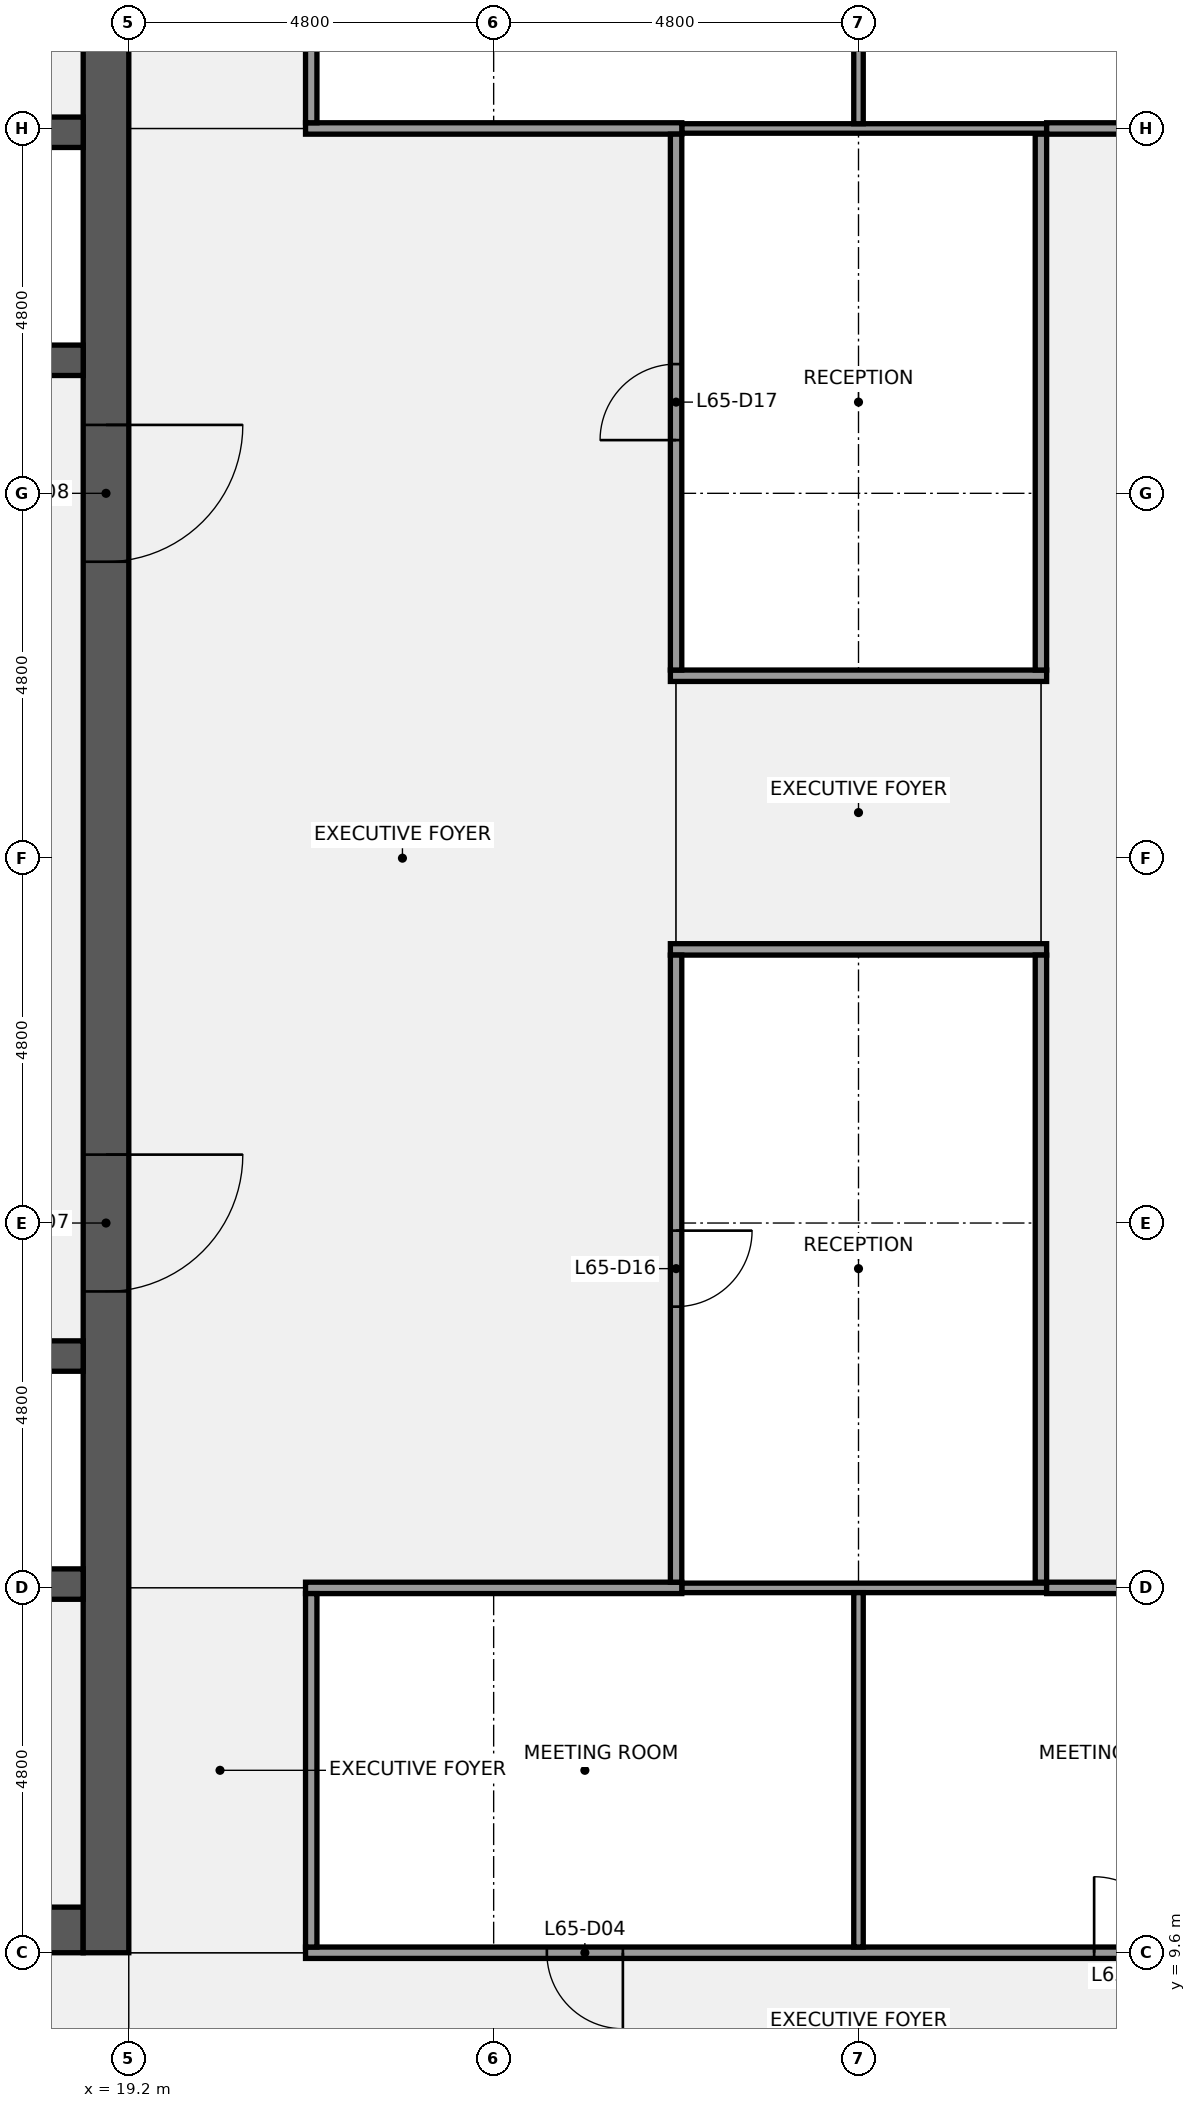
"""IFC4 building model, lengths in metres.
Left out: names, types, materials, properties, quantities, classifications, styles, units other than length and angle.
Written with IfcOpenShell. Run it as: python <this file> out.ifc"""

import sys

from ifc_helpers import new_model, si_unit, direction, frame, frame_2d, origin, place, context, subcontext, project, spatial, rectangle, extrude, element, fill, save


model = new_model("IFC4")
c1 = context("Model", 3, precision=1e-05, world=origin(), true_north=direction((0.0, 1.0)))
c2 = subcontext(c1, "Body", "Model", "MODEL_VIEW")
j1 = project(units=[si_unit("LENGTHUNIT", "METRE"), si_unit("PLANEANGLEUNIT", "RADIAN")], contexts=[c1])
p1 = place(None, origin())
s1 = spatial("IfcSite", under=j1, at=p1, CompositionType="ELEMENT")
p2 = place(p1, origin())
s2 = spatial("IfcBuilding", under=s1, at=p2, CompositionType="ELEMENT")
p3 = place(p2, frame((0.0, 0.0, 298.3)))
s3 = spatial("IfcBuildingStorey", under=s2, at=p3, CompositionType="ELEMENT", Elevation=298.3)
p4 = place(p3, frame((18.6, 9.9, 0.0), z_axis=(0.0, 0.0, 1.0), x_axis=(-1.0, 0.0, 0.0)))
e1 = element("IfcWall", 1, at=p4, inside=s3, PredefinedType="SHEAR", context=c2, shape_type="SweptSolid", body=[
    extrude(rectangle(XDim=4.2, YDim=0.6, at=frame_2d((2.1, 0.0))), origin(), (0.0, 0.0, 1.0), 3.84),
])
p5 = place(p4, frame((1.25, 0.0, 0.0)))
e2 = element("IfcOpeningElement", 2, at=p5, cuts=e1, PredefinedType="OPENING", context=c2, shape_type="SweptSolid", body=[
    extrude(rectangle(XDim=1.1, YDim=2.1, at=frame_2d((0.55, 1.05))), frame((0.0, 0.31, 0.0), z_axis=(0.0, -1.0, 0.0), x_axis=(1.0, 0.0, 0.0)), (0.0, 0.0, 1.0), 0.62),
])
p6 = place(p3, frame((18.9, 38.4, 0.0), z_axis=(0.0, 0.0, 1.0), x_axis=(0.0, -1.0, 0.0)))
e3 = element("IfcWall", 3, at=p6, inside=s3, PredefinedType="SHEAR", context=c2, shape_type="SweptSolid", body=[
    extrude(rectangle(XDim=28.8, YDim=0.6, at=frame_2d((14.4, 0.0))), origin(), (0.0, 0.0, 1.0), 3.84),
])
p7 = place(p6, frame((18.3, 0.0, 0.0)))
e4 = element("IfcOpeningElement", 4, at=p7, cuts=e3, PredefinedType="OPENING", context=c2, shape_type="SweptSolid", body=[
    extrude(rectangle(XDim=1.8, YDim=2.1, at=frame_2d((0.9, 1.05))), frame((0.0, 0.31, 0.0), z_axis=(0.0, -1.0, 0.0), x_axis=(1.0, 0.0, 0.0)), (0.0, 0.0, 1.0), 0.62),
])
p8 = place(p6, frame((8.7, 0.0, 0.0)))
e5 = element("IfcOpeningElement", 5, at=p8, cuts=e3, PredefinedType="OPENING", context=c2, shape_type="SweptSolid", body=[
    extrude(rectangle(XDim=1.8, YDim=2.1, at=frame_2d((0.9, 1.05))), frame((0.0, 0.31, 0.0), z_axis=(0.0, -1.0, 0.0), x_axis=(1.0, 0.0, 0.0)), (0.0, 0.0, 1.0), 0.62),
])
p9 = place(p3, frame((0.6, 14.45, 0.0), z_axis=(0.0, 0.0, 1.0), x_axis=(1.0, 0.0, 0.0)))
e6 = element("IfcWall", 6, at=p9, inside=s3, PredefinedType="SHEAR", context=c2, shape_type="SweptSolid", body=[
    extrude(rectangle(XDim=18.0, YDim=0.4, at=frame_2d((9.0, 0.0))), origin(), (0.0, 0.0, 1.0), 3.84),
])
p10 = place(p3, frame((0.6, 17.45, 0.0), z_axis=(0.0, 0.0, 1.0), x_axis=(1.0, 0.0, 0.0)))
e7 = element("IfcWall", 7, at=p10, inside=s3, PredefinedType="SHEAR", context=c2, shape_type="SweptSolid", body=[
    extrude(rectangle(XDim=18.0, YDim=0.4, at=frame_2d((9.0, 0.0))), origin(), (0.0, 0.0, 1.0), 3.84),
])
p11 = place(p10, frame((1.262, 0.0, 0.0)))
e8 = element("IfcOpeningElement", 8, at=p11, cuts=e7, PredefinedType="OPENING", context=c2, shape_type="SweptSolid", body=[
    extrude(rectangle(XDim=1.0, YDim=2.1, at=frame_2d((0.5, 1.05))), frame((0.0, 0.21, 0.0), z_axis=(0.0, -1.0, 0.0), x_axis=(1.0, 0.0, 0.0)), (0.0, 0.0, 1.0), 0.42),
])
p12 = place(p10, frame((7.3, 0.0, 0.0)))
e9 = element("IfcOpeningElement", 9, at=p12, cuts=e7, PredefinedType="OPENING", context=c2, shape_type="SweptSolid", body=[
    extrude(rectangle(XDim=1.0, YDim=2.1, at=frame_2d((0.5, 1.05))), frame((0.0, 0.21, 0.0), z_axis=(0.0, -1.0, 0.0), x_axis=(1.0, 0.0, 0.0)), (0.0, 0.0, 1.0), 0.42),
])
p13 = place(p10, frame((14.538, 0.0, 0.0)))
e10 = element("IfcOpeningElement", 10, at=p13, cuts=e7, PredefinedType="OPENING", context=c2, shape_type="SweptSolid", body=[
    extrude(rectangle(XDim=1.0, YDim=2.1, at=frame_2d((0.5, 1.05))), frame((0.0, 0.21, 0.0), z_axis=(0.0, -1.0, 0.0), x_axis=(1.0, 0.0, 0.0)), (0.0, 0.0, 1.0), 0.42),
])
p14 = place(p3, frame((0.6, 30.55, 0.0), z_axis=(0.0, 0.0, 1.0), x_axis=(1.0, 0.0, 0.0)))
e11 = element("IfcWall", 11, at=p14, inside=s3, PredefinedType="SHEAR", context=c2, shape_type="SweptSolid", body=[
    extrude(rectangle(XDim=18.0, YDim=0.4, at=frame_2d((9.0, 0.0))), origin(), (0.0, 0.0, 1.0), 3.84),
])
p15 = place(p14, frame((1.6, 0.0, 0.0)))
e12 = element("IfcOpeningElement", 12, at=p15, cuts=e11, PredefinedType="OPENING", context=c2, shape_type="SweptSolid", body=[
    extrude(rectangle(XDim=1.2, YDim=2.1, at=frame_2d((0.6, 1.05))), frame((0.0, 0.21, 0.0), z_axis=(0.0, -1.0, 0.0), x_axis=(1.0, 0.0, 0.0)), (0.0, 0.0, 1.0), 0.42),
])
p16 = place(p14, frame((4.2, 0.0, 0.0)))
e13 = element("IfcOpeningElement", 13, at=p16, cuts=e11, PredefinedType="OPENING", context=c2, shape_type="SweptSolid", body=[
    extrude(rectangle(XDim=1.2, YDim=2.1, at=frame_2d((0.6, 1.05))), frame((0.0, 0.21, 0.0), z_axis=(0.0, -1.0, 0.0), x_axis=(1.0, 0.0, 0.0)), (0.0, 0.0, 1.0), 0.42),
])
p17 = place(p14, frame((6.8, 0.0, 0.0)))
e14 = element("IfcOpeningElement", 14, at=p17, cuts=e11, PredefinedType="OPENING", context=c2, shape_type="SweptSolid", body=[
    extrude(rectangle(XDim=1.2, YDim=2.1, at=frame_2d((0.6, 1.05))), frame((0.0, 0.21, 0.0), z_axis=(0.0, -1.0, 0.0), x_axis=(1.0, 0.0, 0.0)), (0.0, 0.0, 1.0), 0.42),
])
p18 = place(p14, frame((10.0, 0.0, 0.0)))
e15 = element("IfcOpeningElement", 15, at=p18, cuts=e11, PredefinedType="OPENING", context=c2, shape_type="SweptSolid", body=[
    extrude(rectangle(XDim=1.2, YDim=2.1, at=frame_2d((0.6, 1.05))), frame((0.0, 0.21, 0.0), z_axis=(0.0, -1.0, 0.0), x_axis=(1.0, 0.0, 0.0)), (0.0, 0.0, 1.0), 0.42),
])
p19 = place(p14, frame((12.6, 0.0, 0.0)))
e16 = element("IfcOpeningElement", 16, at=p19, cuts=e11, PredefinedType="OPENING", context=c2, shape_type="SweptSolid", body=[
    extrude(rectangle(XDim=1.2, YDim=2.1, at=frame_2d((0.6, 1.05))), frame((0.0, 0.21, 0.0), z_axis=(0.0, -1.0, 0.0), x_axis=(1.0, 0.0, 0.0)), (0.0, 0.0, 1.0), 0.42),
])
p20 = place(p14, frame((15.2, 0.0, 0.0)))
e17 = element("IfcOpeningElement", 17, at=p20, cuts=e11, PredefinedType="OPENING", context=c2, shape_type="SweptSolid", body=[
    extrude(rectangle(XDim=1.2, YDim=2.1, at=frame_2d((0.6, 1.05))), frame((0.0, 0.21, 0.0), z_axis=(0.0, -1.0, 0.0), x_axis=(1.0, 0.0, 0.0)), (0.0, 0.0, 1.0), 0.42),
])
p21 = place(p3, frame((0.6, 33.55, 0.0), z_axis=(0.0, 0.0, 1.0), x_axis=(1.0, 0.0, 0.0)))
e18 = element("IfcWall", 18, at=p21, inside=s3, PredefinedType="SHEAR", context=c2, shape_type="SweptSolid", body=[
    extrude(rectangle(XDim=18.0, YDim=0.4, at=frame_2d((9.0, 0.0))), origin(), (0.0, 0.0, 1.0), 3.84),
])
p22 = place(p3, frame((21.525, 9.6, 0.0), z_axis=(0.0, 0.0, 1.0), x_axis=(1.0, 0.0, 0.0)))
e19 = element("IfcWall", 19, at=p22, inside=s3, PredefinedType="PARTITIONING", context=c2, shape_type="SweptSolid", body=[
    extrude(rectangle(XDim=14.55, YDim=0.15, at=frame_2d((7.275, 0.0))), origin(), (0.0, 0.0, 1.0), 2.849),
])
p23 = place(p22, frame((3.175, 0.0, 0.0)))
e20 = element("IfcOpeningElement", 20, at=p23, cuts=e19, PredefinedType="OPENING", context=c2, shape_type="SweptSolid", body=[
    extrude(rectangle(XDim=1.0, YDim=2.1, at=frame_2d((0.5, 1.05))), frame((0.0, 0.085, 0.0), z_axis=(0.0, -1.0, 0.0), x_axis=(1.0, 0.0, 0.0)), (0.0, 0.0, 1.0), 0.17),
])
p24 = place(p22, frame((10.375, 0.0, 0.0)))
e21 = element("IfcOpeningElement", 21, at=p24, cuts=e19, PredefinedType="OPENING", context=c2, shape_type="SweptSolid", body=[
    extrude(rectangle(XDim=1.0, YDim=2.1, at=frame_2d((0.5, 1.05))), frame((0.0, 0.085, 0.0), z_axis=(0.0, -1.0, 0.0), x_axis=(1.0, 0.0, 0.0)), (0.0, 0.0, 1.0), 0.17),
])
p25 = place(p3, frame((26.475, 14.4, 0.0), z_axis=(0.0, 0.0, 1.0), x_axis=(1.0, 0.0, 0.0)))
e22 = element("IfcWall", 22, at=p25, inside=s3, PredefinedType="PARTITIONING", context=c2, shape_type="SweptSolid", body=[
    extrude(rectangle(XDim=4.8, YDim=0.125, at=frame_2d((2.4, 0.0))), origin(), (0.0, 0.0, 1.0), 2.849),
])
p26 = place(p3, frame((21.525, 14.4, 0.0), z_axis=(0.0, 0.0, 1.0), x_axis=(1.0, 0.0, 0.0)))
e23 = element("IfcWall", 23, at=p26, inside=s3, PredefinedType="PARTITIONING", context=c2, shape_type="SweptSolid", body=[
    extrude(rectangle(XDim=4.95, YDim=0.15, at=frame_2d((2.475, 0.0))), origin(), (0.0, 0.0, 1.0), 2.849),
])
p27 = place(p3, frame((31.275, 14.4, 0.0), z_axis=(0.0, 0.0, 1.0), x_axis=(1.0, 0.0, 0.0)))
e24 = element("IfcWall", 24, at=p27, inside=s3, PredefinedType="PARTITIONING", context=c2, shape_type="SweptSolid", body=[
    extrude(rectangle(XDim=4.8, YDim=0.15, at=frame_2d((2.4, 0.0))), origin(), (0.0, 0.0, 1.0), 2.849),
])
for number, where, z_axis, x_axis in (
    (25, (26.325, 22.8, 0.0), (0.0, 0.0, 1.0), (1.0, 0.0, 0.0)),
    (26, (26.325, 26.4, 0.0), (0.0, 0.0, 1.0), (1.0, 0.0, 0.0)),
):
    element("IfcWall", number, at=place(p3, frame(where, z_axis=z_axis, x_axis=x_axis)), inside=s3, PredefinedType="PARTITIONING", context=c2, shape_type="SweptSolid", body=[
        extrude(rectangle(XDim=4.95, YDim=0.15, at=frame_2d((2.475, 0.0))), origin(), (0.0, 0.0, 1.0), 2.849),
    ])
p28 = place(p3, frame((26.475, 33.6, 0.0), z_axis=(0.0, 0.0, 1.0), x_axis=(1.0, 0.0, 0.0)))
e27 = element("IfcWall", 27, at=p28, inside=s3, PredefinedType="PARTITIONING", context=c2, shape_type="SweptSolid", body=[
    extrude(rectangle(XDim=4.8, YDim=0.125, at=frame_2d((2.4, 0.0))), origin(), (0.0, 0.0, 1.0), 2.849),
])
p29 = place(p3, frame((21.525, 33.6, 0.0), z_axis=(0.0, 0.0, 1.0), x_axis=(1.0, 0.0, 0.0)))
e28 = element("IfcWall", 28, at=p29, inside=s3, PredefinedType="PARTITIONING", context=c2, shape_type="SweptSolid", body=[
    extrude(rectangle(XDim=4.95, YDim=0.15, at=frame_2d((2.475, 0.0))), origin(), (0.0, 0.0, 1.0), 2.849),
])
p30 = place(p3, frame((31.275, 33.6, 0.0), z_axis=(0.0, 0.0, 1.0), x_axis=(1.0, 0.0, 0.0)))
e29 = element("IfcWall", 29, at=p30, inside=s3, PredefinedType="PARTITIONING", context=c2, shape_type="SweptSolid", body=[
    extrude(rectangle(XDim=4.8, YDim=0.15, at=frame_2d((2.4, 0.0))), origin(), (0.0, 0.0, 1.0), 2.849),
])
for number, where, z_axis, x_axis in (
    (30, (21.6, 9.675, 0.0), (0.0, 0.0, 1.0), (0.0, 1.0, 0.0)),
    (31, (21.6, 33.675, 0.0), (0.0, 0.0, 1.0), (0.0, 1.0, 0.0)),
):
    element("IfcWall", number, at=place(p3, frame(where, z_axis=z_axis, x_axis=x_axis)), inside=s3, PredefinedType="PARTITIONING", context=c2, shape_type="SweptSolid", body=[
        extrude(rectangle(XDim=4.65, YDim=0.15, at=frame_2d((2.325, 0.0))), origin(), (0.0, 0.0, 1.0), 2.849),
    ])
p31 = place(p3, frame((26.4, 14.475, 0.0), z_axis=(0.0, 0.0, 1.0), x_axis=(0.0, 1.0, 0.0)))
e32 = element("IfcWall", 32, at=p31, inside=s3, PredefinedType="PARTITIONING", context=c2, shape_type="SweptSolid", body=[
    extrude(rectangle(XDim=8.25, YDim=0.15, at=frame_2d((4.125, 0.0))), origin(), (0.0, 0.0, 1.0), 2.849),
])
p32 = place(p31, frame((3.625, 0.0, 0.0)))
e33 = element("IfcOpeningElement", 33, at=p32, cuts=e32, PredefinedType="OPENING", context=c2, shape_type="SweptSolid", body=[
    extrude(rectangle(XDim=1.0, YDim=2.1, at=frame_2d((0.5, 1.05))), frame((0.0, 0.085, 0.0), z_axis=(0.0, -1.0, 0.0), x_axis=(1.0, 0.0, 0.0)), (0.0, 0.0, 1.0), 0.17),
])
p33 = place(p3, frame((26.4, 26.475, 0.0), z_axis=(0.0, 0.0, 1.0), x_axis=(0.0, 1.0, 0.0)))
e34 = element("IfcWall", 34, at=p33, inside=s3, PredefinedType="PARTITIONING", context=c2, shape_type="SweptSolid", body=[
    extrude(rectangle(XDim=7.05, YDim=0.15, at=frame_2d((3.525, 0.0))), origin(), (0.0, 0.0, 1.0), 2.849),
])
p34 = place(p33, frame((3.025, 0.0, 0.0)))
e35 = element("IfcOpeningElement", 35, at=p34, cuts=e34, PredefinedType="OPENING", context=c2, shape_type="SweptSolid", body=[
    extrude(rectangle(XDim=1.0, YDim=2.1, at=frame_2d((0.5, 1.05))), frame((0.0, 0.085, 0.0), z_axis=(0.0, -1.0, 0.0), x_axis=(1.0, 0.0, 0.0)), (0.0, 0.0, 1.0), 0.17),
])
for number, where, z_axis, x_axis in (
    (36, (28.8, 9.675, 0.0), (0.0, 0.0, 1.0), (0.0, 1.0, 0.0)),
    (37, (28.8, 33.663, 0.0), (0.0, 0.0, 1.0), (0.0, 1.0, 0.0)),
):
    element("IfcWall", number, at=place(p3, frame(where, z_axis=z_axis, x_axis=x_axis)), inside=s3, PredefinedType="PARTITIONING", context=c2, shape_type="SweptSolid", body=[
        extrude(rectangle(XDim=4.662, YDim=0.125, at=frame_2d((2.331, 0.0))), origin(), (0.0, 0.0, 1.0), 2.849),
    ])
p35 = place(p3, frame((31.2, 14.475, 0.0), z_axis=(0.0, 0.0, 1.0), x_axis=(0.0, 1.0, 0.0)))
e38 = element("IfcWall", 38, at=p35, inside=s3, PredefinedType="PARTITIONING", context=c2, shape_type="SweptSolid", body=[
    extrude(rectangle(XDim=8.25, YDim=0.15, at=frame_2d((4.125, 0.0))), origin(), (0.0, 0.0, 1.0), 2.849),
])
p36 = place(p3, frame((31.2, 26.475, 0.0), z_axis=(0.0, 0.0, 1.0), x_axis=(0.0, 1.0, 0.0)))
e39 = element("IfcWall", 39, at=p36, inside=s3, PredefinedType="PARTITIONING", context=c2, shape_type="SweptSolid", body=[
    extrude(rectangle(XDim=7.05, YDim=0.15, at=frame_2d((3.525, 0.0))), origin(), (0.0, 0.0, 1.0), 2.849),
])
p37 = place(p7, origin())
e40 = element("IfcDoor", 40, at=p37, inside=s3, OperationType="DOUBLE_DOOR_SINGLE_SWING", PredefinedType="DOOR", context=c2, shape_type="SweptSolid", body=[
    extrude(rectangle(XDim=1.8, YDim=2.1, at=frame_2d((0.9, 1.05))), frame((0.0, 0.025, 0.0), z_axis=(0.0, -1.0, 0.0), x_axis=(1.0, 0.0, 0.0)), (0.0, 0.0, 1.0), 0.05),
])
fill(e4, e40)
p38 = place(p8, origin())
e41 = element("IfcDoor", 41, at=p38, inside=s3, OperationType="DOUBLE_DOOR_SINGLE_SWING", PredefinedType="DOOR", context=c2, shape_type="SweptSolid", body=[
    extrude(rectangle(XDim=1.8, YDim=2.1, at=frame_2d((0.9, 1.05))), frame((0.0, 0.025, 0.0), z_axis=(0.0, -1.0, 0.0), x_axis=(1.0, 0.0, 0.0)), (0.0, 0.0, 1.0), 0.05),
])
fill(e5, e41)
p39 = place(p23, origin())
e42 = element("IfcDoor", 42, at=p39, inside=s3, OperationType="SINGLE_SWING_RIGHT", PredefinedType="DOOR", context=c2, shape_type="SweptSolid", body=[
    extrude(rectangle(XDim=1.0, YDim=2.1, at=frame_2d((0.5, 1.05))), frame((0.0, 0.025, 0.0), z_axis=(0.0, -1.0, 0.0), x_axis=(1.0, 0.0, 0.0)), (0.0, 0.0, 1.0), 0.05),
])
fill(e20, e42)
p40 = place(p24, origin())
e43 = element("IfcDoor", 43, at=p40, inside=s3, OperationType="SINGLE_SWING_LEFT", PredefinedType="DOOR", context=c2, shape_type="SweptSolid", body=[
    extrude(rectangle(XDim=1.0, YDim=2.1, at=frame_2d((0.5, 1.05))), frame((0.0, 0.025, 0.0), z_axis=(0.0, -1.0, 0.0), x_axis=(1.0, 0.0, 0.0)), (0.0, 0.0, 1.0), 0.05),
])
fill(e21, e43)
p41 = place(p32, origin())
e44 = element("IfcDoor", 44, at=p41, inside=s3, OperationType="SINGLE_SWING_RIGHT", PredefinedType="DOOR", context=c2, shape_type="SweptSolid", body=[
    extrude(rectangle(XDim=1.0, YDim=2.1, at=frame_2d((0.5, 1.05))), frame((0.0, 0.025, 0.0), z_axis=(0.0, -1.0, 0.0), x_axis=(1.0, 0.0, 0.0)), (0.0, 0.0, 1.0), 0.05),
])
fill(e33, e44)
p42 = place(p34, origin())
e45 = element("IfcDoor", 45, at=p42, inside=s3, OperationType="SINGLE_SWING_LEFT", PredefinedType="DOOR", context=c2, shape_type="SweptSolid", body=[
    extrude(rectangle(XDim=1.0, YDim=2.1, at=frame_2d((0.5, 1.05))), frame((0.0, 0.025, 0.0), z_axis=(0.0, -1.0, 0.0), x_axis=(1.0, 0.0, 0.0)), (0.0, 0.0, 1.0), 0.05),
])
fill(e35, e45)
save(model, sys.argv[1])
